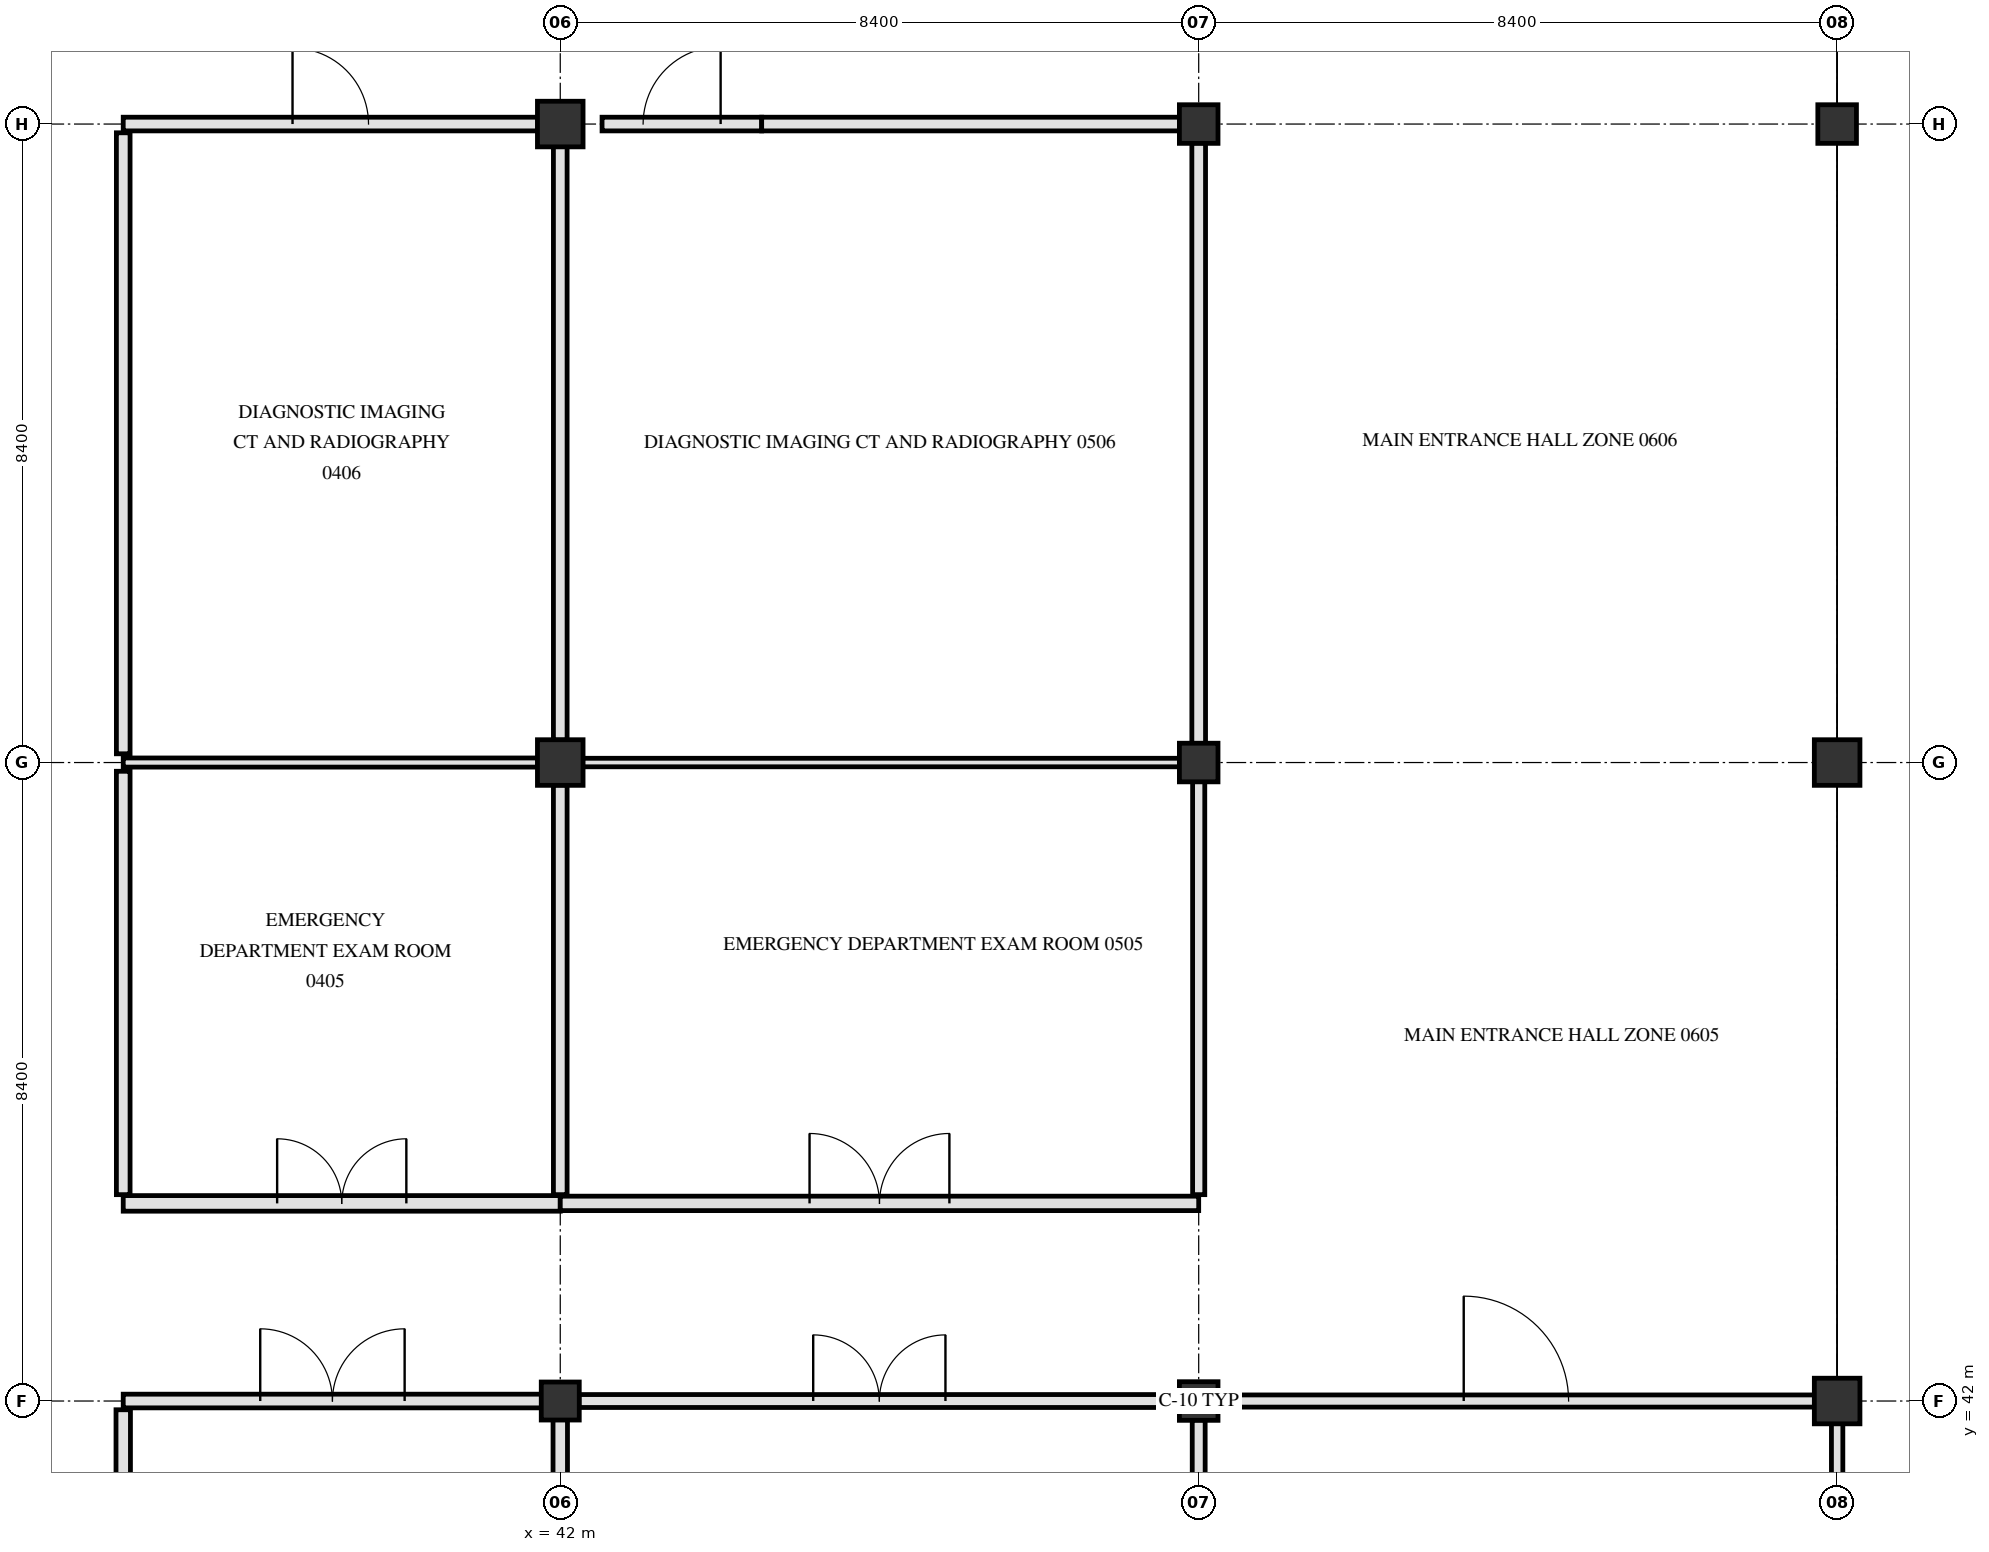
"""IFC4 building model, lengths in metres.
Left out: names, types, materials, properties, quantities, classifications, styles, units other than length and angle.
Written with IfcOpenShell. Run it as: python <this file> out.ifc"""

import sys

from ifc_helpers import new_model, si_unit, direction, frame, frame_2d, origin, origin_2d, place, context, subcontext, project, spatial, rectangle, hollow_circle, extrude, element, fill, save


model = new_model("IFC4")
c1 = context("Model", 3, precision=1e-05, world=origin(), true_north=direction((0.0, 1.0)))
c2 = subcontext(c1, "Body", "Model", "MODEL_VIEW")
j1 = project(units=[si_unit("LENGTHUNIT", "METRE"), si_unit("PLANEANGLEUNIT", "RADIAN")], contexts=[c1])
p1 = place(None, origin())
s1 = spatial("IfcSite", under=j1, at=p1, CompositionType="ELEMENT")
p2 = place(p1, origin())
s2 = spatial("IfcBuilding", under=s1, at=p2, CompositionType="ELEMENT")
p3 = place(p2, origin())
s3 = spatial("IfcBuildingStorey", under=s2, at=p3, CompositionType="ELEMENT", Elevation=0.0)
p4 = place(p3, frame((42.0, 42.0, 0.0), z_axis=(0.0, 0.0, 1.0), x_axis=(1.0, 0.0, 0.0)))
e1 = element("IfcColumn", 1, at=p4, inside=s3, PredefinedType="COLUMN", context=c2, shape_type="SweptSolid", body=[
    extrude(rectangle(XDim=0.5, YDim=0.5, at=origin_2d()), origin(), (0.0, 0.0, 1.0), 4.8),
])
for number, where, z_axis, x_axis in (
    (2, (42.0, 50.4, 0.0), (0.0, 0.0, 1.0), (1.0, 0.0, 0.0)),
    (3, (42.0, 58.8, 0.0), (0.0, 0.0, 1.0), (1.0, 0.0, 0.0)),
):
    element("IfcColumn", number, at=place(p3, frame(where, z_axis=z_axis, x_axis=x_axis)), inside=s3, PredefinedType="COLUMN", context=c2, shape_type="SweptSolid", body=[
        extrude(rectangle(XDim=0.6, YDim=0.6, at=origin_2d()), origin(), (0.0, 0.0, 1.0), 4.8),
    ])
for number, where, z_axis, x_axis in (
    (4, (50.4, 42.0, 0.0), (0.0, 0.0, 1.0), (1.0, 0.0, 0.0)),
    (5, (50.4, 50.4, 0.0), (0.0, 0.0, 1.0), (1.0, 0.0, 0.0)),
    (6, (50.4, 58.8, 0.0), (0.0, 0.0, 1.0), (1.0, 0.0, 0.0)),
):
    element("IfcColumn", number, at=place(p3, frame(where, z_axis=z_axis, x_axis=x_axis)), inside=s3, PredefinedType="COLUMN", context=c2, shape_type="SweptSolid", body=[
        extrude(hollow_circle(Radius=0.254, WallThickness=0.02, at=origin_2d()), origin(), (0.0, 0.0, 1.0), 4.8),
    ])
for number, where, z_axis, x_axis in (
    (7, (58.8, 42.0, 0.0), (0.0, 0.0, 1.0), (1.0, 0.0, 0.0)),
    (8, (58.8, 50.4, 0.0), (0.0, 0.0, 1.0), (1.0, 0.0, 0.0)),
):
    element("IfcColumn", number, at=place(p3, frame(where, z_axis=z_axis, x_axis=x_axis)), inside=s3, PredefinedType="COLUMN", context=c2, shape_type="SweptSolid", body=[
        extrude(rectangle(XDim=0.6, YDim=0.6, at=origin_2d()), origin(), (0.0, 0.0, 1.0), 4.8),
    ])
p5 = place(p3, frame((58.8, 58.8, 0.0), z_axis=(0.0, 0.0, 1.0), x_axis=(1.0, 0.0, 0.0)))
e9 = element("IfcColumn", 9, at=p5, inside=s3, PredefinedType="COLUMN", context=c2, shape_type="SweptSolid", body=[
    extrude(hollow_circle(Radius=0.254, WallThickness=0.02, at=origin_2d()), origin(), (0.0, 0.0, 1.0), 4.8),
])
p6 = place(p3, frame((36.25, 42.0, 0.0), z_axis=(0.0, 0.0, 1.0), x_axis=(1.0, 0.0, 0.0)))
e10 = element("IfcWall", 10, at=p6, inside=s3, PredefinedType="PARTITIONING", context=c2, shape_type="SweptSolid", body=[
    extrude(rectangle(XDim=5.505, YDim=0.18, at=frame_2d((2.752, 0.0))), origin(), (0.0, 0.0, 1.0), 3.84),
])
p7 = place(p6, frame((1.802, 0.0, 0.0)))
e11 = element("IfcOpeningElement", 11, at=p7, cuts=e10, PredefinedType="OPENING", context=c2, shape_type="SweptSolid", body=[
    extrude(rectangle(XDim=1.9, YDim=2.3, at=frame_2d((0.95, 1.15))), frame((0.0, 0.1, 0.0), z_axis=(0.0, -1.0, 0.0), x_axis=(1.0, 0.0, 0.0)), (0.0, 0.0, 1.0), 0.2),
])
p8 = place(p3, frame((42.245, 42.0, 0.0), z_axis=(0.0, 0.0, 1.0), x_axis=(1.0, 0.0, 0.0)))
e12 = element("IfcWall", 12, at=p8, inside=s3, PredefinedType="PARTITIONING", context=c2, shape_type="SweptSolid", body=[
    extrude(rectangle(XDim=7.906, YDim=0.17, at=frame_2d((3.953, 0.0))), origin(), (0.0, 0.0, 1.0), 3.84),
])
p9 = place(p8, frame((3.083, 0.0, 0.0)))
e13 = element("IfcOpeningElement", 13, at=p9, cuts=e12, PredefinedType="OPENING", context=c2, shape_type="SweptSolid", body=[
    extrude(rectangle(XDim=1.74, YDim=2.24, at=frame_2d((0.87, 1.12))), frame((0.0, 0.095, 0.0), z_axis=(0.0, -1.0, 0.0), x_axis=(1.0, 0.0, 0.0)), (0.0, 0.0, 1.0), 0.19),
])
p10 = place(p3, frame((50.649, 42.0, 0.0), z_axis=(0.0, 0.0, 1.0), x_axis=(1.0, 0.0, 0.0)))
e14 = element("IfcWall", 14, at=p10, inside=s3, PredefinedType="PARTITIONING", context=c2, shape_type="SweptSolid", body=[
    extrude(rectangle(XDim=7.856, YDim=0.16, at=frame_2d((3.928, 0.0))), origin(), (0.0, 0.0, 1.0), 3.84),
])
p11 = place(p10, frame((3.238, 0.0, 0.0)))
e15 = element("IfcOpeningElement", 15, at=p11, cuts=e14, PredefinedType="OPENING", context=c2, shape_type="SweptSolid", body=[
    extrude(rectangle(XDim=1.38, YDim=2.22, at=frame_2d((0.69, 1.11))), frame((0.0, 0.09, 0.0), z_axis=(0.0, -1.0, 0.0), x_axis=(1.0, 0.0, 0.0)), (0.0, 0.0, 1.0), 0.18),
])
p12 = place(p3, frame((36.25, 44.6, 0.0), z_axis=(0.0, 0.0, 1.0), x_axis=(1.0, 0.0, 0.0)))
e16 = element("IfcWall", 16, at=p12, inside=s3, PredefinedType="PARTITIONING", context=c2, shape_type="SweptSolid", body=[
    extrude(rectangle(XDim=5.75, YDim=0.205, at=frame_2d((2.875, 0.0))), origin(), (0.0, 0.0, 1.0), 3.89),
])
p13 = place(p12, frame((2.025, 0.0, 0.0)))
e17 = element("IfcOpeningElement", 17, at=p13, cuts=e16, PredefinedType="OPENING", context=c2, shape_type="SweptSolid", body=[
    extrude(rectangle(XDim=1.7, YDim=2.25, at=frame_2d((0.85, 1.125))), frame((0.0, 0.113, 0.0), z_axis=(0.0, -1.0, 0.0), x_axis=(1.0, 0.0, 0.0)), (0.0, 0.0, 1.0), 0.225),
])
p14 = place(p3, frame((42.0, 44.6, 0.0), z_axis=(0.0, 0.0, 1.0), x_axis=(1.0, 0.0, 0.0)))
e18 = element("IfcWall", 18, at=p14, inside=s3, PredefinedType="PARTITIONING", context=c2, shape_type="SweptSolid", body=[
    extrude(rectangle(XDim=8.4, YDim=0.19, at=frame_2d((4.2, 0.0))), origin(), (0.0, 0.0, 1.0), 3.89),
])
p15 = place(p14, frame((3.28, 0.0, 0.0)))
e19 = element("IfcOpeningElement", 19, at=p15, cuts=e18, PredefinedType="OPENING", context=c2, shape_type="SweptSolid", body=[
    extrude(rectangle(XDim=1.84, YDim=2.28, at=frame_2d((0.92, 1.14))), frame((0.0, 0.105, 0.0), z_axis=(0.0, -1.0, 0.0), x_axis=(1.0, 0.0, 0.0)), (0.0, 0.0, 1.0), 0.21),
])
p16 = place(p3, frame((36.25, 50.4, 0.0), z_axis=(0.0, 0.0, 1.0), x_axis=(1.0, 0.0, 0.0)))
e20 = element("IfcWall", 20, at=p16, inside=s3, PredefinedType="PARTITIONING", context=c2, shape_type="SweptSolid", body=[
    extrude(rectangle(XDim=5.455, YDim=0.12, at=frame_2d((2.728, 0.0))), origin(), (0.0, 0.0, 1.0), 3.84),
])
p17 = place(p3, frame((42.295, 50.4, 0.0), z_axis=(0.0, 0.0, 1.0), x_axis=(1.0, 0.0, 0.0)))
e21 = element("IfcWall", 21, at=p17, inside=s3, PredefinedType="PARTITIONING", context=c2, shape_type="SweptSolid", body=[
    extrude(rectangle(XDim=7.856, YDim=0.112, at=frame_2d((3.928, 0.0))), origin(), (0.0, 0.0, 1.0), 3.84),
])
p18 = place(p3, frame((36.25, 58.8, 0.0), z_axis=(0.0, 0.0, 1.0), x_axis=(1.0, 0.0, 0.0)))
e22 = element("IfcWall", 22, at=p18, inside=s3, PredefinedType="PARTITIONING", context=c2, shape_type="SweptSolid", body=[
    extrude(rectangle(XDim=5.455, YDim=0.18, at=frame_2d((2.728, 0.0))), origin(), (0.0, 0.0, 1.0), 3.84),
])
p19 = place(p18, frame((2.228, 0.0, 0.0)))
e23 = element("IfcOpeningElement", 23, at=p19, cuts=e22, PredefinedType="OPENING", context=c2, shape_type="SweptSolid", body=[
    extrude(rectangle(XDim=1.0, YDim=2.15, at=frame_2d((0.5, 1.075))), frame((0.0, 0.1, 0.0), z_axis=(0.0, -1.0, 0.0), x_axis=(1.0, 0.0, 0.0)), (0.0, 0.0, 1.0), 0.2),
])
p20 = place(p3, frame((42.55, 58.8, 0.0), z_axis=(0.0, 0.0, 1.0), x_axis=(1.0, 0.0, 0.0)))
e24 = element("IfcWall", 24, at=p20, inside=s3, PredefinedType="PARTITIONING", context=c2, shape_type="SweptSolid", body=[
    extrude(rectangle(XDim=2.1, YDim=0.18, at=frame_2d((1.05, 0.0))), origin(), (0.0, 0.0, 1.0), 3.84),
])
p21 = place(p20, frame((0.54, 0.0, 0.0)))
e25 = element("IfcOpeningElement", 25, at=p21, cuts=e24, PredefinedType="OPENING", context=c2, shape_type="SweptSolid", body=[
    extrude(rectangle(XDim=1.02, YDim=2.12, at=frame_2d((0.51, 1.06))), frame((0.0, 0.1, 0.0), z_axis=(0.0, -1.0, 0.0), x_axis=(1.0, 0.0, 0.0)), (0.0, 0.0, 1.0), 0.2),
])
p22 = place(p3, frame((44.65, 58.8, 0.0), z_axis=(0.0, 0.0, 1.0), x_axis=(1.0, 0.0, 0.0)))
e26 = element("IfcWall", 26, at=p22, inside=s3, PredefinedType="PARTITIONING", context=c2, shape_type="SweptSolid", body=[
    extrude(rectangle(XDim=5.501, YDim=0.18, at=frame_2d((2.75, 0.0))), origin(), (0.0, 0.0, 1.0), 3.84),
])
p23 = place(p3, frame((36.25, 33.715, 0.0), z_axis=(0.0, 0.0, 1.0), x_axis=(0.0, 1.0, 0.0)))
e27 = element("IfcWall", 27, at=p23, inside=s3, PredefinedType="PARTITIONING", context=c2, shape_type="SweptSolid", body=[
    extrude(rectangle(XDim=8.17, YDim=0.19, at=frame_2d((4.085, 0.0))), origin(), (0.0, 0.0, 1.0), 3.84),
])
p24 = place(p3, frame((36.25, 44.715, 0.0), z_axis=(0.0, 0.0, 1.0), x_axis=(0.0, 1.0, 0.0)))
e28 = element("IfcWall", 28, at=p24, inside=s3, PredefinedType="PARTITIONING", context=c2, shape_type="SweptSolid", body=[
    extrude(rectangle(XDim=5.57, YDim=0.18, at=frame_2d((2.785, 0.0))), origin(), (0.0, 0.0, 1.0), 3.84),
])
p25 = place(p3, frame((36.25, 50.515, 0.0), z_axis=(0.0, 0.0, 1.0), x_axis=(0.0, 1.0, 0.0)))
e29 = element("IfcWall", 29, at=p25, inside=s3, PredefinedType="PARTITIONING", context=c2, shape_type="SweptSolid", body=[
    extrude(rectangle(XDim=8.17, YDim=0.18, at=frame_2d((4.085, 0.0))), origin(), (0.0, 0.0, 1.0), 3.84),
])
p26 = place(p3, frame((42.0, 33.845, 0.0), z_axis=(0.0, 0.0, 1.0), x_axis=(0.0, 1.0, 0.0)))
e30 = element("IfcWall", 30, at=p26, inside=s3, PredefinedType="PARTITIONING", context=c2, shape_type="SweptSolid", body=[
    extrude(rectangle(XDim=7.91, YDim=0.19, at=frame_2d((3.955, 0.0))), origin(), (0.0, 0.0, 1.0), 3.89),
])
p27 = place(p3, frame((42.0, 44.715, 0.0), z_axis=(0.0, 0.0, 1.0), x_axis=(0.0, 1.0, 0.0)))
e31 = element("IfcWall", 31, at=p27, inside=s3, PredefinedType="PARTITIONING", context=c2, shape_type="SweptSolid", body=[
    extrude(rectangle(XDim=5.39, YDim=0.18, at=frame_2d((2.695, 0.0))), origin(), (0.0, 0.0, 1.0), 3.89),
])
p28 = place(p3, frame((42.0, 50.695, 0.0), z_axis=(0.0, 0.0, 1.0), x_axis=(0.0, 1.0, 0.0)))
e32 = element("IfcWall", 32, at=p28, inside=s3, PredefinedType="PARTITIONING", context=c2, shape_type="SweptSolid", body=[
    extrude(rectangle(XDim=7.81, YDim=0.18, at=frame_2d((3.905, 0.0))), origin(), (0.0, 0.0, 1.0), 3.89),
])
p29 = place(p3, frame((50.4, 33.849, 0.0), z_axis=(0.0, 0.0, 1.0), x_axis=(0.0, 1.0, 0.0)))
e33 = element("IfcWall", 33, at=p29, inside=s3, PredefinedType="PARTITIONING", context=c2, shape_type="SweptSolid", body=[
    extrude(rectangle(XDim=7.902, YDim=0.17, at=frame_2d((3.951, 0.0))), origin(), (0.0, 0.0, 1.0), 4.09),
])
p30 = place(p3, frame((50.4, 44.715, 0.0), z_axis=(0.0, 0.0, 1.0), x_axis=(0.0, 1.0, 0.0)))
e34 = element("IfcWall", 34, at=p30, inside=s3, PredefinedType="PARTITIONING", context=c2, shape_type="SweptSolid", body=[
    extrude(rectangle(XDim=5.436, YDim=0.16, at=frame_2d((2.718, 0.0))), origin(), (0.0, 0.0, 1.0), 4.09),
])
p31 = place(p3, frame((50.4, 50.649, 0.0), z_axis=(0.0, 0.0, 1.0), x_axis=(0.0, 1.0, 0.0)))
e35 = element("IfcWall", 35, at=p31, inside=s3, PredefinedType="PARTITIONING", context=c2, shape_type="SweptSolid", body=[
    extrude(rectangle(XDim=7.902, YDim=0.18, at=frame_2d((3.951, 0.0))), origin(), (0.0, 0.0, 1.0), 4.09),
])
p32 = place(p3, frame((58.8, 33.895, 0.0), z_axis=(0.0, 0.0, 1.0), x_axis=(0.0, 1.0, 0.0)))
e36 = element("IfcWall", 36, at=p32, inside=s3, PredefinedType="PARTITIONING", context=c2, shape_type="SweptSolid", body=[
    extrude(rectangle(XDim=7.81, YDim=0.15, at=frame_2d((3.905, 0.0))), origin(), (0.0, 0.0, 1.0), 3.89),
])
p33 = place(p7, origin())
e37 = element("IfcDoor", 37, at=p33, inside=s3, OperationType="DOUBLE_SWING_LEFT", PredefinedType="DOOR", context=c2, shape_type="SweptSolid", body=[
    extrude(rectangle(XDim=1.9, YDim=2.3, at=frame_2d((0.95, 1.15))), frame((0.0, 0.025, 0.0), z_axis=(0.0, -1.0, 0.0), x_axis=(1.0, 0.0, 0.0)), (0.0, 0.0, 1.0), 0.05),
])
fill(e11, e37)
p34 = place(p13, origin())
e38 = element("IfcDoor", 38, at=p34, inside=s3, OperationType="DOUBLE_SWING_RIGHT", PredefinedType="DOOR", context=c2, shape_type="SweptSolid", body=[
    extrude(rectangle(XDim=1.7, YDim=2.25, at=frame_2d((0.85, 1.125))), frame((0.0, 0.025, 0.0), z_axis=(0.0, -1.0, 0.0), x_axis=(1.0, 0.0, 0.0)), (0.0, 0.0, 1.0), 0.05),
])
fill(e17, e38)
p35 = place(p19, origin())
e39 = element("IfcDoor", 39, at=p35, inside=s3, OperationType="SINGLE_SWING_LEFT", PredefinedType="DOOR", context=c2, shape_type="SweptSolid", body=[
    extrude(rectangle(XDim=1.0, YDim=2.15, at=frame_2d((0.5, 1.075))), frame((0.0, 0.025, 0.0), z_axis=(0.0, -1.0, 0.0), x_axis=(1.0, 0.0, 0.0)), (0.0, 0.0, 1.0), 0.05),
])
fill(e23, e39)
p36 = place(p9, origin())
e40 = element("IfcDoor", 40, at=p36, inside=s3, OperationType="DOUBLE_SWING_RIGHT", PredefinedType="DOOR", context=c2, shape_type="SweptSolid", body=[
    extrude(rectangle(XDim=1.74, YDim=2.24, at=frame_2d((0.87, 1.12))), frame((0.0, 0.025, 0.0), z_axis=(0.0, -1.0, 0.0), x_axis=(1.0, 0.0, 0.0)), (0.0, 0.0, 1.0), 0.05),
])
fill(e13, e40)
p37 = place(p15, origin())
e41 = element("IfcDoor", 41, at=p37, inside=s3, OperationType="DOUBLE_SWING_LEFT", PredefinedType="DOOR", context=c2, shape_type="SweptSolid", body=[
    extrude(rectangle(XDim=1.84, YDim=2.28, at=frame_2d((0.92, 1.14))), frame((0.0, 0.025, 0.0), z_axis=(0.0, -1.0, 0.0), x_axis=(1.0, 0.0, 0.0)), (0.0, 0.0, 1.0), 0.05),
])
fill(e19, e41)
p38 = place(p21, origin())
e42 = element("IfcDoor", 42, at=p38, inside=s3, OperationType="SINGLE_SWING_RIGHT", PredefinedType="DOOR", context=c2, shape_type="SweptSolid", body=[
    extrude(rectangle(XDim=1.02, YDim=2.12, at=frame_2d((0.51, 1.06))), frame((0.0, 0.025, 0.0), z_axis=(0.0, -1.0, 0.0), x_axis=(1.0, 0.0, 0.0)), (0.0, 0.0, 1.0), 0.05),
])
fill(e25, e42)
p39 = place(p11, origin())
e43 = element("IfcDoor", 43, at=p39, inside=s3, OperationType="SINGLE_SWING_LEFT", PredefinedType="DOOR", context=c2, shape_type="SweptSolid", body=[
    extrude(rectangle(XDim=1.38, YDim=2.22, at=frame_2d((0.69, 1.11))), frame((0.0, 0.025, 0.0), z_axis=(0.0, -1.0, 0.0), x_axis=(1.0, 0.0, 0.0)), (0.0, 0.0, 1.0), 0.05),
])
fill(e15, e43)
save(model, sys.argv[1])
